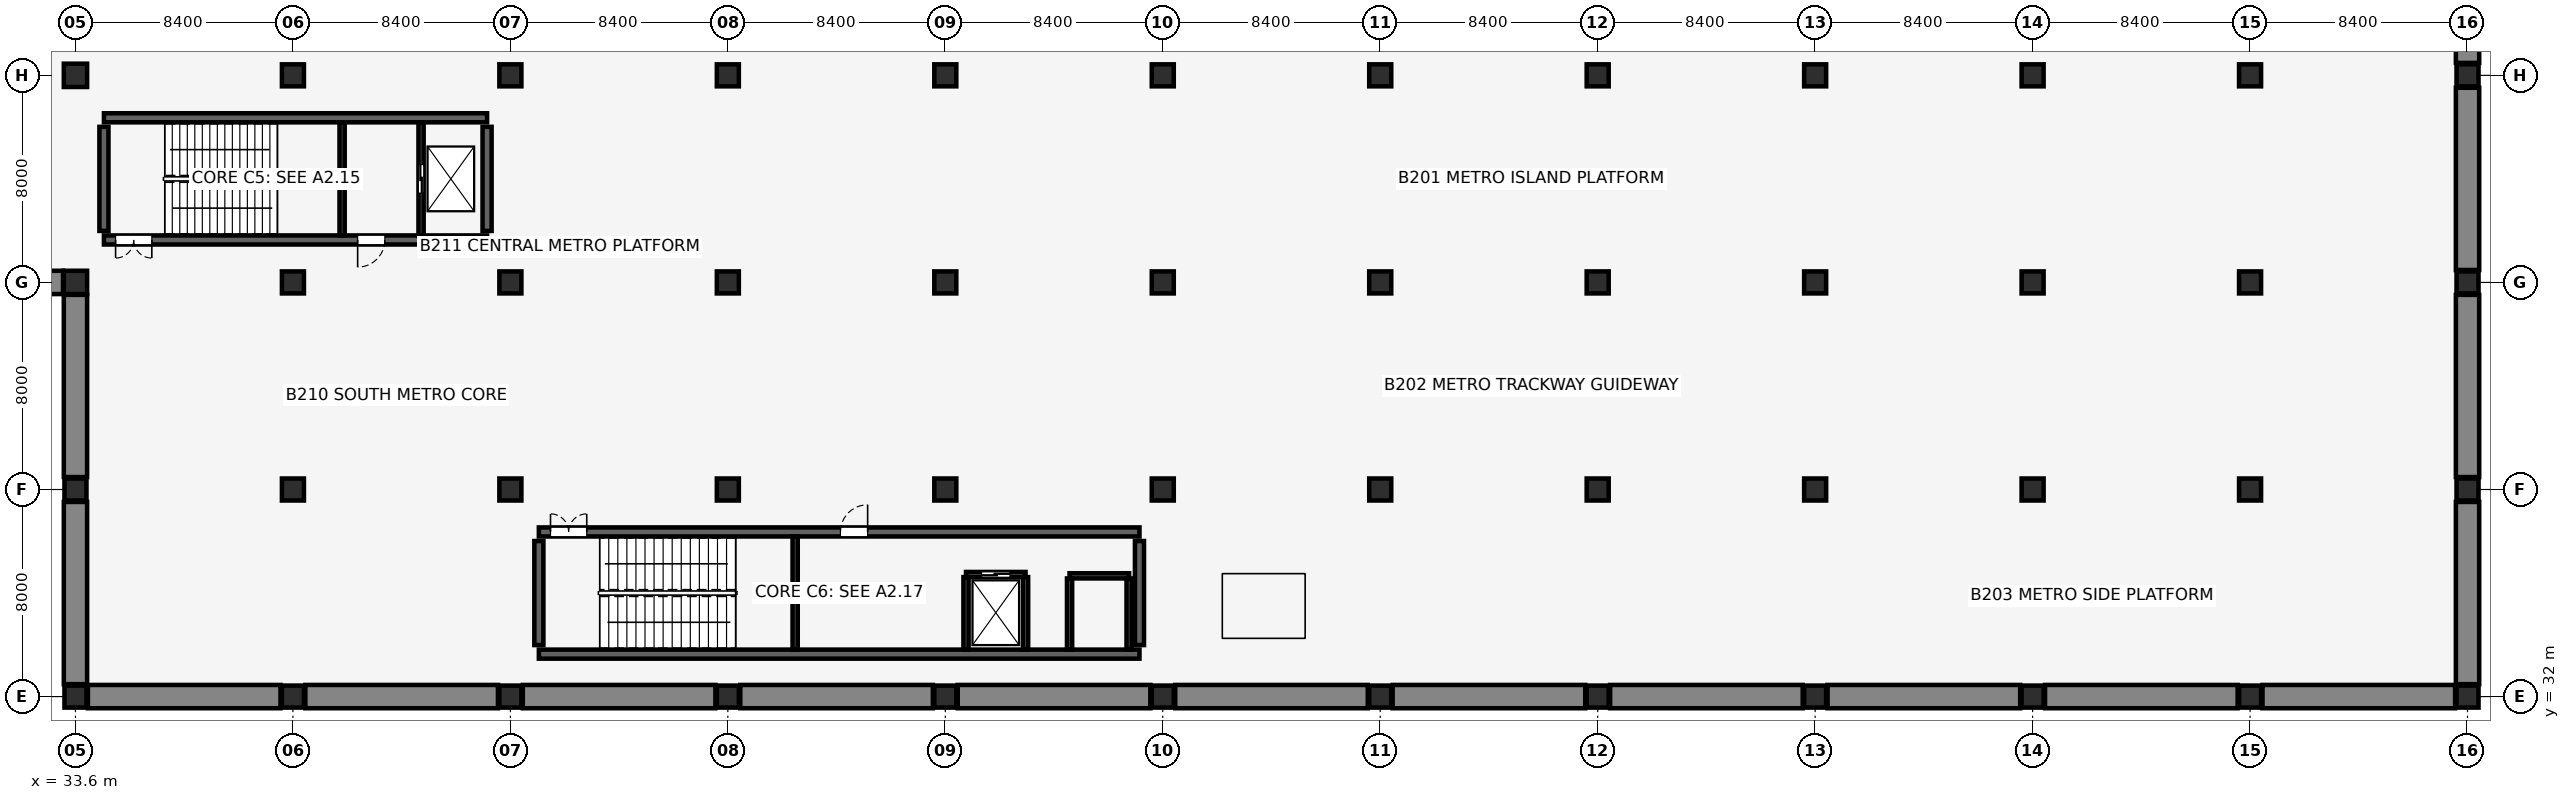
"""IFC4 building model, lengths in metres.
Left out: names, types, materials, properties, quantities, classifications, styles, units other than length and angle.
Written with IfcOpenShell. Run it as: python <this file> out.ifc"""

import sys

from ifc_helpers import new_model, si_unit, direction, frame, frame_2d, origin, origin_2d, place, context, subcontext, project, spatial, rectangle, extrude, element, fill, save


model = new_model("IFC4")
c1 = context("Model", 3, precision=1e-05, world=origin(), true_north=direction((0.0, 1.0)))
c2 = subcontext(c1, "Body", "Model", "MODEL_VIEW")
j1 = project(units=[si_unit("LENGTHUNIT", "METRE"), si_unit("PLANEANGLEUNIT", "RADIAN")], contexts=[c1])
p1 = place(None, origin())
s1 = spatial("IfcSite", under=j1, at=p1, CompositionType="ELEMENT")
p2 = place(p1, origin())
s2 = spatial("IfcBuilding", under=s1, at=p2, CompositionType="ELEMENT")
p3 = place(p2, frame((0.0, 0.0, -10.88)))
s3 = spatial("IfcBuildingStorey", under=s2, at=p3, CompositionType="ELEMENT", Elevation=-10.88)
for number, where, z_axis, x_axis in (
    (1, (34.08, 32.0, 0.0), (0.0, 0.0, 1.0), (1.0, 0.0, 0.0)),
    (2, (42.48, 32.0, 0.0), (0.0, 0.0, 1.0), (1.0, 0.0, 0.0)),
):
    element("IfcWall", number, at=place(p3, frame(where, z_axis=z_axis, x_axis=x_axis)), inside=s3, PredefinedType="SHEAR", context=c2, shape_type="SweptSolid", body=[
        extrude(rectangle(XDim=7.44, YDim=0.9, at=frame_2d((3.72, 0.0))), origin(), (0.0, 0.0, 1.0), 5.04),
    ])
p4 = place(p3, frame((50.88, 32.0, 0.0), z_axis=(0.0, 0.0, 1.0), x_axis=(1.0, 0.0, 0.0)))
e3 = element("IfcWall", 3, at=p4, inside=s3, PredefinedType="SHEAR", context=c2, shape_type="SweptSolid", body=[
    extrude(rectangle(XDim=7.44, YDim=0.9, at=frame_2d((3.72, 0.0))), origin(), (0.0, 0.0, 1.0), 5.04),
])
p5 = place(p3, frame((59.28, 32.0, 0.0), z_axis=(0.0, 0.0, 1.0), x_axis=(1.0, 0.0, 0.0)))
e4 = element("IfcWall", 4, at=p5, inside=s3, PredefinedType="SHEAR", context=c2, shape_type="SweptSolid", body=[
    extrude(rectangle(XDim=7.44, YDim=0.9, at=frame_2d((3.72, 0.0))), origin(), (0.0, 0.0, 1.0), 5.04),
])
p6 = place(p3, frame((67.68, 32.0, 0.0), z_axis=(0.0, 0.0, 1.0), x_axis=(1.0, 0.0, 0.0)))
e5 = element("IfcWall", 5, at=p6, inside=s3, PredefinedType="SHEAR", context=c2, shape_type="SweptSolid", body=[
    extrude(rectangle(XDim=7.44, YDim=0.9, at=frame_2d((3.72, 0.0))), origin(), (0.0, 0.0, 1.0), 5.04),
])
for number, where, z_axis, x_axis in (
    (6, (76.08, 32.0, 0.0), (0.0, 0.0, 1.0), (1.0, 0.0, 0.0)),
    (7, (84.48, 32.0, 0.0), (0.0, 0.0, 1.0), (1.0, 0.0, 0.0)),
):
    element("IfcWall", number, at=place(p3, frame(where, z_axis=z_axis, x_axis=x_axis)), inside=s3, PredefinedType="SHEAR", context=c2, shape_type="SweptSolid", body=[
        extrude(rectangle(XDim=7.44, YDim=0.9, at=frame_2d((3.72, 0.0))), origin(), (0.0, 0.0, 1.0), 5.04),
    ])
p7 = place(p3, frame((92.88, 32.0, 0.0), z_axis=(0.0, 0.0, 1.0), x_axis=(1.0, 0.0, 0.0)))
e8 = element("IfcWall", 8, at=p7, inside=s3, PredefinedType="SHEAR", context=c2, shape_type="SweptSolid", body=[
    extrude(rectangle(XDim=7.44, YDim=0.9, at=frame_2d((3.72, 0.0))), origin(), (0.0, 0.0, 1.0), 5.04),
])
p8 = place(p3, frame((101.28, 32.0, 0.0), z_axis=(0.0, 0.0, 1.0), x_axis=(1.0, 0.0, 0.0)))
e9 = element("IfcWall", 9, at=p8, inside=s3, PredefinedType="SHEAR", context=c2, shape_type="SweptSolid", body=[
    extrude(rectangle(XDim=7.44, YDim=0.9, at=frame_2d((3.72, 0.0))), origin(), (0.0, 0.0, 1.0), 5.04),
])
p9 = place(p3, frame((109.68, 32.0, 0.0), z_axis=(0.0, 0.0, 1.0), x_axis=(1.0, 0.0, 0.0)))
e10 = element("IfcWall", 10, at=p9, inside=s3, PredefinedType="SHEAR", context=c2, shape_type="SweptSolid", body=[
    extrude(rectangle(XDim=7.44, YDim=0.9, at=frame_2d((3.72, 0.0))), origin(), (0.0, 0.0, 1.0), 5.04),
])
p10 = place(p3, frame((118.08, 32.0, 0.0), z_axis=(0.0, 0.0, 1.0), x_axis=(1.0, 0.0, 0.0)))
e11 = element("IfcWall", 11, at=p10, inside=s3, PredefinedType="SHEAR", context=c2, shape_type="SweptSolid", body=[
    extrude(rectangle(XDim=7.44, YDim=0.9, at=frame_2d((3.72, 0.0))), origin(), (0.0, 0.0, 1.0), 5.04),
])
for number, where, z_axis, x_axis in (
    (12, (33.6, 32.48, 0.0), (0.0, 0.0, 1.0), (0.0, 1.0, 0.0)),
    (13, (33.6, 40.48, 0.0), (0.0, 0.0, 1.0), (0.0, 1.0, 0.0)),
):
    element("IfcWall", number, at=place(p3, frame(where, z_axis=z_axis, x_axis=x_axis)), inside=s3, PredefinedType="SHEAR", context=c2, shape_type="SweptSolid", body=[
        extrude(rectangle(XDim=7.04, YDim=0.9, at=frame_2d((3.52, 0.0))), origin(), (0.0, 0.0, 1.0), 5.04),
    ])
p11 = place(p3, frame((25.68, 48.0, 0.0), z_axis=(0.0, 0.0, 1.0), x_axis=(1.0, 0.0, 0.0)))
e14 = element("IfcWall", 14, at=p11, inside=s3, PredefinedType="SHEAR", context=c2, shape_type="SweptSolid", body=[
    extrude(rectangle(XDim=7.44, YDim=0.9, at=frame_2d((3.72, 0.0))), origin(), (0.0, 0.0, 1.0), 5.04),
])
for number, where, z_axis, x_axis in (
    (15, (126.0, 32.48, 0.0), (0.0, 0.0, 1.0), (0.0, 1.0, 0.0)),
    (16, (126.0, 40.48, 0.0), (0.0, 0.0, 1.0), (0.0, 1.0, 0.0)),
    (17, (126.0, 48.48, 0.0), (0.0, 0.0, 1.0), (0.0, 1.0, 0.0)),
    (18, (126.0, 56.48, 0.0), (0.0, 0.0, 1.0), (0.0, 1.0, 0.0)),
):
    element("IfcWall", number, at=place(p3, frame(where, z_axis=z_axis, x_axis=x_axis)), inside=s3, PredefinedType="SHEAR", context=c2, shape_type="SweptSolid", body=[
        extrude(rectangle(XDim=7.04, YDim=0.9, at=frame_2d((3.52, 0.0))), origin(), (0.0, 0.0, 1.0), 5.04),
    ])
p12 = place(p3, frame((34.7, 49.64, 0.0), z_axis=(0.0, 0.0, 1.0), x_axis=(1.0, 0.0, 0.0)))
e19 = element("IfcWall", 19, at=p12, inside=s3, PredefinedType="SHEAR", context=c2, shape_type="SweptSolid", body=[
    extrude(rectangle(XDim=14.8, YDim=0.35, at=frame_2d((7.4, 0.0))), origin(), (0.0, 0.0, 1.0), 5.04),
])
p13 = place(p12, frame((1.85, 0.0, 0.0), z_axis=(0.0, 0.0, 1.0), x_axis=(-1.0, 0.0, 0.0)))
e20 = element("IfcOpeningElement", 20, at=p13, cuts=e19, PredefinedType="OPENING", context=c2, shape_type="SweptSolid", body=[
    extrude(rectangle(XDim=1.4, YDim=2.15, at=frame_2d((0.7, 1.075))), frame((0.0, 0.185, 0.0), z_axis=(0.0, -1.0, 0.0), x_axis=(1.0, 0.0, 0.0)), (0.0, 0.0, 1.0), 0.37),
])
p14 = place(p12, frame((10.85, 0.0, 0.0), z_axis=(0.0, 0.0, 1.0), x_axis=(-1.0, 0.0, 0.0)))
e21 = element("IfcOpeningElement", 21, at=p14, cuts=e19, PredefinedType="OPENING", context=c2, shape_type="SweptSolid", body=[
    extrude(rectangle(XDim=1.05, YDim=2.15, at=frame_2d((0.525, 1.075))), frame((0.0, 0.185, 0.0), z_axis=(0.0, -1.0, 0.0), x_axis=(1.0, 0.0, 0.0)), (0.0, 0.0, 1.0), 0.37),
])
p15 = place(p3, frame((34.7, 54.36, 0.0), z_axis=(0.0, 0.0, 1.0), x_axis=(1.0, 0.0, 0.0)))
e22 = element("IfcWall", 22, at=p15, inside=s3, PredefinedType="SHEAR", context=c2, shape_type="SweptSolid", body=[
    extrude(rectangle(XDim=14.8, YDim=0.35, at=frame_2d((7.4, 0.0))), origin(), (0.0, 0.0, 1.0), 5.04),
])
for number, where, z_axis, x_axis in (
    (23, (34.7, 49.99, 0.0), (0.0, 0.0, 1.0), (0.0, 1.0, 0.0)),
    (24, (49.5, 49.99, 0.0), (0.0, 0.0, 1.0), (0.0, 1.0, 0.0)),
):
    element("IfcWall", number, at=place(p3, frame(where, z_axis=z_axis, x_axis=x_axis)), inside=s3, PredefinedType="SHEAR", context=c2, shape_type="SweptSolid", body=[
        extrude(rectangle(XDim=4.02, YDim=0.35, at=frame_2d((2.01, 0.0))), origin(), (0.0, 0.0, 1.0), 5.04),
    ])
p16 = place(p3, frame((51.5, 33.64, 0.0), z_axis=(0.0, 0.0, 1.0), x_axis=(1.0, 0.0, 0.0)))
e25 = element("IfcWall", 25, at=p16, inside=s3, PredefinedType="SHEAR", context=c2, shape_type="SweptSolid", body=[
    extrude(rectangle(XDim=23.2, YDim=0.35, at=frame_2d((11.6, 0.0))), origin(), (0.0, 0.0, 1.0), 5.04),
])
p17 = place(p3, frame((51.5, 38.36, 0.0), z_axis=(0.0, 0.0, 1.0), x_axis=(1.0, 0.0, 0.0)))
e26 = element("IfcWall", 26, at=p17, inside=s3, PredefinedType="SHEAR", context=c2, shape_type="SweptSolid", body=[
    extrude(rectangle(XDim=23.2, YDim=0.35, at=frame_2d((11.6, 0.0))), origin(), (0.0, 0.0, 1.0), 5.04),
])
p18 = place(p17, frame((0.45, 0.0, 0.0), z_axis=(0.0, 0.0, 1.0), x_axis=(1.0, 0.0, 0.0)))
e27 = element("IfcOpeningElement", 27, at=p18, cuts=e26, PredefinedType="OPENING", context=c2, shape_type="SweptSolid", body=[
    extrude(rectangle(XDim=1.4, YDim=2.15, at=frame_2d((0.7, 1.075))), frame((0.0, 0.185, 0.0), z_axis=(0.0, -1.0, 0.0), x_axis=(1.0, 0.0, 0.0)), (0.0, 0.0, 1.0), 0.37),
])
p19 = place(p17, frame((11.65, 0.0, 0.0), z_axis=(0.0, 0.0, 1.0), x_axis=(1.0, 0.0, 0.0)))
e28 = element("IfcOpeningElement", 28, at=p19, cuts=e26, PredefinedType="OPENING", context=c2, shape_type="SweptSolid", body=[
    extrude(rectangle(XDim=1.05, YDim=2.15, at=frame_2d((0.525, 1.075))), frame((0.0, 0.185, 0.0), z_axis=(0.0, -1.0, 0.0), x_axis=(1.0, 0.0, 0.0)), (0.0, 0.0, 1.0), 0.37),
])
for number, where, z_axis, x_axis in (
    (29, (51.5, 33.99, 0.0), (0.0, 0.0, 1.0), (0.0, 1.0, 0.0)),
    (30, (74.7, 33.99, 0.0), (0.0, 0.0, 1.0), (0.0, 1.0, 0.0)),
):
    element("IfcWall", number, at=place(p3, frame(where, z_axis=z_axis, x_axis=x_axis)), inside=s3, PredefinedType="SHEAR", context=c2, shape_type="SweptSolid", body=[
        extrude(rectangle(XDim=4.02, YDim=0.35, at=frame_2d((2.01, 0.0))), origin(), (0.0, 0.0, 1.0), 5.04),
    ])
for number, where, z_axis, x_axis in (
    (31, (33.6, 32.0, 0.0), (0.0, 0.0, 1.0), (1.0, 0.0, 0.0)),
    (32, (33.6, 40.0, 0.0), (0.0, 0.0, 1.0), (1.0, 0.0, 0.0)),
):
    element("IfcColumn", number, at=place(p3, frame(where, z_axis=z_axis, x_axis=x_axis)), inside=s3, PredefinedType="COLUMN", context=c2, shape_type="SweptSolid", body=[
        extrude(rectangle(XDim=0.85, YDim=0.85, at=origin_2d()), origin(), (0.0, 0.0, 1.0), 5.04),
    ])
for number, where, z_axis, x_axis in (
    (33, (33.6, 48.0, 0.0), (0.0, 0.0, 1.0), (1.0, 0.0, 0.0)),
    (34, (33.6, 56.0, 0.0), (0.0, 0.0, 1.0), (1.0, 0.0, 0.0)),
):
    element("IfcColumn", number, at=place(p3, frame(where, z_axis=z_axis, x_axis=x_axis)), inside=s3, PredefinedType="COLUMN", context=c2, shape_type="SweptSolid", body=[
        extrude(rectangle(XDim=0.9, YDim=0.9, at=origin_2d()), origin(), (0.0, 0.0, 1.0), 5.04),
    ])
for number, where, z_axis, x_axis in (
    (35, (42.0, 32.0, 0.0), (0.0, 0.0, 1.0), (1.0, 0.0, 0.0)),
    (36, (42.0, 40.0, 0.0), (0.0, 0.0, 1.0), (1.0, 0.0, 0.0)),
    (37, (42.0, 48.0, 0.0), (0.0, 0.0, 1.0), (1.0, 0.0, 0.0)),
    (38, (42.0, 56.0, 0.0), (0.0, 0.0, 1.0), (1.0, 0.0, 0.0)),
    (39, (50.4, 32.0, 0.0), (0.0, 0.0, 1.0), (1.0, 0.0, 0.0)),
    (40, (50.4, 40.0, 0.0), (0.0, 0.0, 1.0), (1.0, 0.0, 0.0)),
    (41, (50.4, 48.0, 0.0), (0.0, 0.0, 1.0), (1.0, 0.0, 0.0)),
    (42, (50.4, 56.0, 0.0), (0.0, 0.0, 1.0), (1.0, 0.0, 0.0)),
    (43, (58.8, 32.0, 0.0), (0.0, 0.0, 1.0), (1.0, 0.0, 0.0)),
    (44, (58.8, 40.0, 0.0), (0.0, 0.0, 1.0), (1.0, 0.0, 0.0)),
    (45, (58.8, 48.0, 0.0), (0.0, 0.0, 1.0), (1.0, 0.0, 0.0)),
    (46, (58.8, 56.0, 0.0), (0.0, 0.0, 1.0), (1.0, 0.0, 0.0)),
    (47, (67.2, 32.0, 0.0), (0.0, 0.0, 1.0), (1.0, 0.0, 0.0)),
    (48, (67.2, 40.0, 0.0), (0.0, 0.0, 1.0), (1.0, 0.0, 0.0)),
    (49, (67.2, 48.0, 0.0), (0.0, 0.0, 1.0), (1.0, 0.0, 0.0)),
    (50, (67.2, 56.0, 0.0), (0.0, 0.0, 1.0), (1.0, 0.0, 0.0)),
    (51, (75.6, 32.0, 0.0), (0.0, 0.0, 1.0), (1.0, 0.0, 0.0)),
    (52, (75.6, 40.0, 0.0), (0.0, 0.0, 1.0), (1.0, 0.0, 0.0)),
    (53, (75.6, 48.0, 0.0), (0.0, 0.0, 1.0), (1.0, 0.0, 0.0)),
    (54, (75.6, 56.0, 0.0), (0.0, 0.0, 1.0), (1.0, 0.0, 0.0)),
    (55, (84.0, 32.0, 0.0), (0.0, 0.0, 1.0), (1.0, 0.0, 0.0)),
    (56, (84.0, 40.0, 0.0), (0.0, 0.0, 1.0), (1.0, 0.0, 0.0)),
    (57, (84.0, 48.0, 0.0), (0.0, 0.0, 1.0), (1.0, 0.0, 0.0)),
    (58, (84.0, 56.0, 0.0), (0.0, 0.0, 1.0), (1.0, 0.0, 0.0)),
    (59, (92.4, 32.0, 0.0), (0.0, 0.0, 1.0), (1.0, 0.0, 0.0)),
    (60, (92.4, 40.0, 0.0), (0.0, 0.0, 1.0), (1.0, 0.0, 0.0)),
    (61, (92.4, 48.0, 0.0), (0.0, 0.0, 1.0), (1.0, 0.0, 0.0)),
    (62, (92.4, 56.0, 0.0), (0.0, 0.0, 1.0), (1.0, 0.0, 0.0)),
    (63, (100.8, 32.0, 0.0), (0.0, 0.0, 1.0), (1.0, 0.0, 0.0)),
    (64, (100.8, 40.0, 0.0), (0.0, 0.0, 1.0), (1.0, 0.0, 0.0)),
    (65, (100.8, 48.0, 0.0), (0.0, 0.0, 1.0), (1.0, 0.0, 0.0)),
    (66, (100.8, 56.0, 0.0), (0.0, 0.0, 1.0), (1.0, 0.0, 0.0)),
    (67, (109.2, 32.0, 0.0), (0.0, 0.0, 1.0), (1.0, 0.0, 0.0)),
    (68, (109.2, 40.0, 0.0), (0.0, 0.0, 1.0), (1.0, 0.0, 0.0)),
    (69, (109.2, 48.0, 0.0), (0.0, 0.0, 1.0), (1.0, 0.0, 0.0)),
    (70, (109.2, 56.0, 0.0), (0.0, 0.0, 1.0), (1.0, 0.0, 0.0)),
    (71, (117.6, 32.0, 0.0), (0.0, 0.0, 1.0), (1.0, 0.0, 0.0)),
    (72, (117.6, 40.0, 0.0), (0.0, 0.0, 1.0), (1.0, 0.0, 0.0)),
    (73, (117.6, 48.0, 0.0), (0.0, 0.0, 1.0), (1.0, 0.0, 0.0)),
    (74, (117.6, 56.0, 0.0), (0.0, 0.0, 1.0), (1.0, 0.0, 0.0)),
    (75, (126.0, 32.0, 0.0), (0.0, 0.0, 1.0), (1.0, 0.0, 0.0)),
    (76, (126.0, 40.0, 0.0), (0.0, 0.0, 1.0), (1.0, 0.0, 0.0)),
    (77, (126.0, 48.0, 0.0), (0.0, 0.0, 1.0), (1.0, 0.0, 0.0)),
    (78, (126.0, 56.0, 0.0), (0.0, 0.0, 1.0), (1.0, 0.0, 0.0)),
):
    element("IfcColumn", number, at=place(p3, frame(where, z_axis=z_axis, x_axis=x_axis)), inside=s3, PredefinedType="COLUMN", context=c2, shape_type="SweptSolid", body=[
        extrude(rectangle(XDim=0.85, YDim=0.85, at=origin_2d()), origin(), (0.0, 0.0, 1.0), 5.04),
    ])
p20 = place(p3, frame((43.9, 49.815, 0.0), z_axis=(0.0, 0.0, 1.0), x_axis=(0.0, 1.0, 0.0)))
e79 = element("IfcWall", 79, at=p20, inside=s3, PredefinedType="SHEAR", context=c2, shape_type="SweptSolid", body=[
    extrude(rectangle(XDim=4.37, YDim=0.2, at=frame_2d((2.185, 0.0))), origin(), (0.0, 0.0, 1.0), 5.04),
])
p21 = place(p3, frame((46.95, 49.815, 0.0), z_axis=(0.0, 0.0, 1.0), x_axis=(0.0, 1.0, 0.0)))
e80 = element("IfcWall", 80, at=p21, inside=s3, PredefinedType="SHEAR", context=c2, shape_type="SweptSolid", body=[
    extrude(rectangle(XDim=4.37, YDim=0.2, at=frame_2d((2.185, 0.0))), origin(), (0.0, 0.0, 1.0), 5.04),
])
p22 = place(p21, frame((1.635, 0.0, 0.0), z_axis=(0.0, 0.0, 1.0), x_axis=(1.0, 0.0, 0.0)))
e81 = element("IfcOpeningElement", 81, at=p22, cuts=e80, PredefinedType="OPENING", context=c2, shape_type="SweptSolid", body=[
    extrude(rectangle(XDim=1.1, YDim=2.15, at=frame_2d((0.55, 1.075))), frame((0.0, 0.11, 0.0), z_axis=(0.0, -1.0, 0.0), x_axis=(1.0, 0.0, 0.0)), (0.0, 0.0, 1.0), 0.22),
])
p23 = place(p3, frame((61.4, 33.815, 0.0), z_axis=(0.0, 0.0, 1.0), x_axis=(0.0, 1.0, 0.0)))
e82 = element("IfcWall", 82, at=p23, inside=s3, PredefinedType="SHEAR", context=c2, shape_type="SweptSolid", body=[
    extrude(rectangle(XDim=4.37, YDim=0.2, at=frame_2d((2.185, 0.0))), origin(), (0.0, 0.0, 1.0), 5.04),
])
p24 = place(p3, frame((68.0, 36.715, 0.0), z_axis=(0.0, 0.0, 1.0), x_axis=(1.0, 0.0, 0.0)))
e83 = element("IfcWall", 83, at=p24, inside=s3, PredefinedType="SHEAR", context=c2, shape_type="SweptSolid", body=[
    extrude(rectangle(XDim=2.3, YDim=0.2, at=frame_2d((1.15, 0.0))), origin(), (0.0, 0.0, 1.0), 5.04),
])
p25 = place(p24, frame((0.6, 0.0, 0.0), z_axis=(0.0, 0.0, 1.0), x_axis=(1.0, 0.0, 0.0)))
e84 = element("IfcOpeningElement", 84, at=p25, cuts=e83, PredefinedType="OPENING", context=c2, shape_type="SweptSolid", body=[
    extrude(rectangle(XDim=1.1, YDim=2.15, at=frame_2d((0.55, 1.075))), frame((0.0, 0.11, 0.0), z_axis=(0.0, -1.0, 0.0), x_axis=(1.0, 0.0, 0.0)), (0.0, 0.0, 1.0), 0.22),
])
for number, where, z_axis, x_axis in (
    (85, (68.0, 33.815, 0.0), (0.0, 0.0, 1.0), (0.0, 1.0, 0.0)),
    (86, (70.3, 33.815, 0.0), (0.0, 0.0, 1.0), (0.0, 1.0, 0.0)),
):
    element("IfcWall", number, at=place(p3, frame(where, z_axis=z_axis, x_axis=x_axis)), inside=s3, PredefinedType="SHEAR", context=c2, shape_type="SweptSolid", body=[
        extrude(rectangle(XDim=2.8, YDim=0.2, at=frame_2d((1.4, 0.0))), origin(), (0.0, 0.0, 1.0), 5.04),
    ])
p26 = place(p3, frame((72.0, 36.665, 0.0), z_axis=(0.0, 0.0, 1.0), x_axis=(1.0, 0.0, 0.0)))
e87 = element("IfcWall", 87, at=p26, inside=s3, PredefinedType="SHEAR", context=c2, shape_type="SweptSolid", body=[
    extrude(rectangle(XDim=2.3, YDim=0.2, at=frame_2d((1.15, 0.0))), origin(), (0.0, 0.0, 1.0), 5.04),
])
for number, where, z_axis, x_axis in (
    (88, (72.0, 33.815, 0.0), (0.0, 0.0, 1.0), (0.0, 1.0, 0.0)),
    (89, (74.3, 33.815, 0.0), (0.0, 0.0, 1.0), (0.0, 1.0, 0.0)),
):
    element("IfcWall", number, at=place(p3, frame(where, z_axis=z_axis, x_axis=x_axis)), inside=s3, PredefinedType="SHEAR", context=c2, shape_type="SweptSolid", body=[
        extrude(rectangle(XDim=2.75, YDim=0.2, at=frame_2d((1.375, 0.0))), origin(), (0.0, 0.0, 1.0), 5.04),
    ])
p27 = place(p13, origin())
e90 = element("IfcDoor", 90, at=p27, inside=s3, OperationType="DOUBLE_DOOR_SINGLE_SWING", PredefinedType="DOOR", context=c2, shape_type="SweptSolid", body=[
    extrude(rectangle(XDim=1.4, YDim=2.15, at=frame_2d((0.7, 1.075))), frame((0.0, 0.025, 0.0), z_axis=(0.0, -1.0, 0.0), x_axis=(1.0, 0.0, 0.0)), (0.0, 0.0, 1.0), 0.05),
])
fill(e20, e90)
p28 = place(p14, origin())
e91 = element("IfcDoor", 91, at=p28, inside=s3, OperationType="SINGLE_SWING_RIGHT", PredefinedType="DOOR", context=c2, shape_type="SweptSolid", body=[
    extrude(rectangle(XDim=1.05, YDim=2.15, at=frame_2d((0.525, 1.075))), frame((0.0, 0.025, 0.0), z_axis=(0.0, -1.0, 0.0), x_axis=(1.0, 0.0, 0.0)), (0.0, 0.0, 1.0), 0.05),
])
fill(e21, e91)
p29 = place(p22, origin())
e92 = element("IfcDoor", 92, at=p29, inside=s3, OperationType="DOUBLE_DOOR_SLIDING", PredefinedType="DOOR", context=c2, shape_type="SweptSolid", body=[
    extrude(rectangle(XDim=1.1, YDim=2.15, at=frame_2d((0.55, 1.075))), frame((0.0, 0.025, 0.0), z_axis=(0.0, -1.0, 0.0), x_axis=(1.0, 0.0, 0.0)), (0.0, 0.0, 1.0), 0.05),
])
fill(e81, e92)
p30 = place(p18, origin())
e93 = element("IfcDoor", 93, at=p30, inside=s3, OperationType="DOUBLE_DOOR_SINGLE_SWING", PredefinedType="DOOR", context=c2, shape_type="SweptSolid", body=[
    extrude(rectangle(XDim=1.4, YDim=2.15, at=frame_2d((0.7, 1.075))), frame((0.0, 0.025, 0.0), z_axis=(0.0, -1.0, 0.0), x_axis=(1.0, 0.0, 0.0)), (0.0, 0.0, 1.0), 0.05),
])
fill(e27, e93)
p31 = place(p19, origin())
e94 = element("IfcDoor", 94, at=p31, inside=s3, OperationType="SINGLE_SWING_RIGHT", PredefinedType="DOOR", context=c2, shape_type="SweptSolid", body=[
    extrude(rectangle(XDim=1.05, YDim=2.15, at=frame_2d((0.525, 1.075))), frame((0.0, 0.025, 0.0), z_axis=(0.0, -1.0, 0.0), x_axis=(1.0, 0.0, 0.0)), (0.0, 0.0, 1.0), 0.05),
])
fill(e28, e94)
p32 = place(p25, origin())
e95 = element("IfcDoor", 95, at=p32, inside=s3, OperationType="DOUBLE_DOOR_SLIDING", PredefinedType="DOOR", context=c2, shape_type="SweptSolid", body=[
    extrude(rectangle(XDim=1.1, YDim=2.15, at=frame_2d((0.55, 1.075))), frame((0.0, 0.025, 0.0), z_axis=(0.0, -1.0, 0.0), x_axis=(1.0, 0.0, 0.0)), (0.0, 0.0, 1.0), 0.05),
])
fill(e84, e95)
save(model, sys.argv[1])
